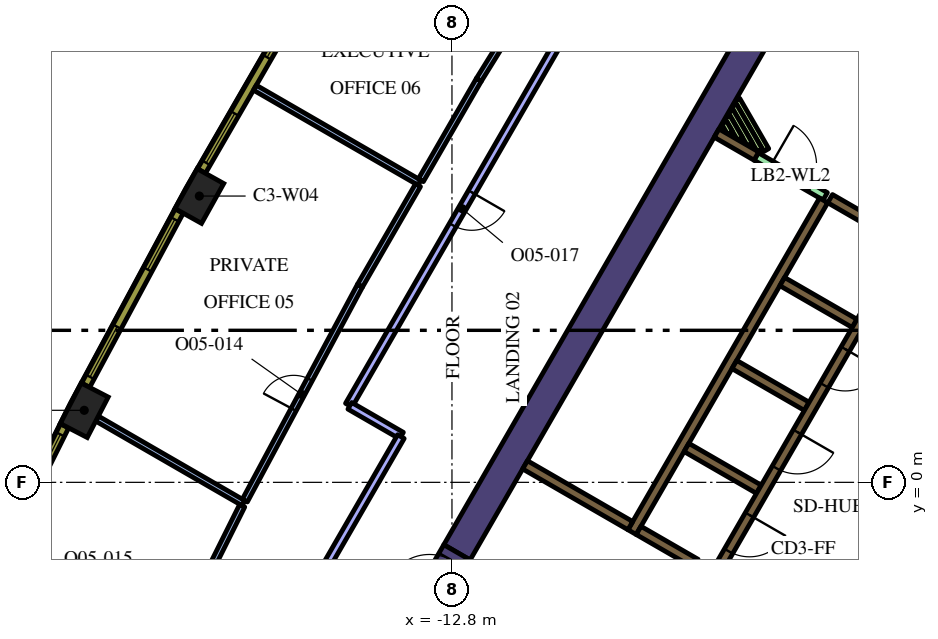
"""IFC4 building model, lengths in metres.
Left out: names, types, materials, properties, quantities, classifications, styles, units other than length and angle.
Written with IfcOpenShell. Run it as: python <this file> out.ifc"""

import sys

from ifc_helpers import new_model, si_unit, direction, frame, frame_2d, origin, origin_2d, place, context, subcontext, project, spatial, polyline, rectangle, outline, extrude, element, fill, save


model = new_model("IFC4")
c1 = context("Model", 3, precision=1e-05, world=origin(), true_north=direction((0.0, 1.0)))
c2 = subcontext(c1, "Body", "Model", "MODEL_VIEW")
j1 = project(units=[si_unit("LENGTHUNIT", "METRE"), si_unit("PLANEANGLEUNIT", "RADIAN")], contexts=[c1])
p1 = place(None, origin())
s1 = spatial("IfcSite", under=j1, at=p1, CompositionType="ELEMENT")
p2 = place(p1, origin())
s2 = spatial("IfcBuilding", under=s1, at=p2, CompositionType="ELEMENT")
p3 = place(p2, frame((0.0, 0.0, 192.0)))
s3 = spatial("IfcBuildingStorey", under=s2, at=p3, CompositionType="ELEMENT", Elevation=192.0)
for number, where, z_axis, x_axis in (
    (1, (-19.447, 7.533, 0.0), (0.0, 0.0, 1.0), (-0.487, -0.874, 0.0)),
    (2, (-22.476, 1.896, 0.0), (0.0, 0.0, 1.0), (-0.46, -0.888, 0.0)),
):
    element("IfcColumn", number, at=place(p3, frame(where, z_axis=z_axis, x_axis=x_axis)), inside=s3, PredefinedType="COLUMN", context=c2, shape_type="SweptSolid", body=[
        extrude(rectangle(XDim=1.2, YDim=0.8, at=origin_2d()), origin(), (0.0, 0.0, 1.0), 4.2),
    ])
p4 = place(p3, frame((-4.321, 12.616, 0.0), z_axis=(0.0, 0.0, 1.0), x_axis=(-0.500009809857, -0.866019739987, 0.0)))
e3 = element("IfcWall", 3, at=p4, inside=s3, PredefinedType="SOLIDWALL", context=c2, shape_type="SweptSolid", body=[
    extrude(rectangle(XDim=16.695, YDim=0.8, at=frame_2d((8.347, 0.0))), origin(), (0.0, 0.0, 1.0), 4.2),
])
p5 = place(p3, frame((-3.02, 7.419, 0.0), z_axis=(0.0, 0.0, 1.0), x_axis=(-0.500022956343, -0.866012149528, 0.0)))
e4 = element("IfcWall", 4, at=p5, inside=s3, PredefinedType="SOLIDWALL", context=c2, shape_type="SweptSolid", body=[
    extrude(rectangle(XDim=10.08, YDim=0.25, at=frame_2d((5.04, 0.0))), origin(), (0.0, 0.0, 1.0), 4.2),
])
p6 = place(p3, origin())
e5 = element("IfcWall", 5, at=p6, inside=s3, PredefinedType="SOLIDWALL", context=c2, shape_type="SweptSolid", body=[
    extrude(outline(polyline([(-2.912, 7.356), (-2.787, 7.573), (-1.232, 6.675), (-1.303, 6.675), (-1.304, 6.675), (-1.304, 6.675), (-1.304, 6.525), (-1.304, 6.525), (-1.303, 6.525), (-0.971, 6.525), (-0.665, 6.348), (-0.79, 6.132), (-1.007, 6.257), (-1.007, 6.257), (-2.912, 7.356)])), origin(), (0.0, 0.0, 1.0), 4.2),
])
for number, where, z_axis, x_axis in (
    (6, (-2.204, 4.182, 0.0), (0.0, 0.0, 1.0), (-0.866, 0.5, 0.0)),
    (7, (-5.369, 3.1, 0.0), (0.0, 0.0, 1.0), (0.866, -0.5, 0.0)),
    (8, (-4.724, -0.182, 0.0), (0.0, 0.0, 1.0), (-0.866, 0.5, 0.0)),
):
    element("IfcWall", number, at=place(p3, frame(where, z_axis=z_axis, x_axis=x_axis)), inside=s3, PredefinedType="SOLIDWALL", context=c2, shape_type="SweptSolid", body=[
        extrude(rectangle(XDim=2.2, YDim=0.25, at=frame_2d((1.1, 0.0))), origin(), (0.0, 0.0, 1.0), 4.2),
    ])
p7 = place(p3, frame((-7.889, -1.265, 0.0), z_axis=(0.0, 0.0, 1.0), x_axis=(0.865986741702, -0.500066958712, 0.0)))
e9 = element("IfcWall", 9, at=p7, inside=s3, PredefinedType="SOLIDWALL", context=c2, shape_type="SweptSolid", body=[
    extrude(rectangle(XDim=1.738, YDim=0.25, at=frame_2d((0.869, 0.0))), origin(), (0.0, 0.0, 1.0), 4.2),
])
p8 = place(p3, frame((-8.106, -1.14, 0.0), z_axis=(0.0, 0.0, 1.0), x_axis=(-0.866008981251, 0.500028443584, 0.0)))
e10 = element("IfcWall", 10, at=p8, inside=s3, PredefinedType="SOLIDWALL", context=c2, shape_type="SweptSolid", body=[
    extrude(rectangle(XDim=3.2, YDim=0.25, at=frame_2d((1.6, 0.0))), origin(), (0.0, 0.0, 1.0), 4.2),
])
p9 = place(p3, frame((-5.837, 9.19, 0.0), z_axis=(0.0, 0.0, 1.0), x_axis=(0.866024298998, -0.500001913541, 0.0)))
e11 = element("IfcWall", 11, at=p9, inside=s3, PredefinedType="SOLIDWALL", context=c2, shape_type="SweptSolid", body=[
    extrude(rectangle(XDim=1.21, YDim=0.25, at=frame_2d((0.605, 0.0))), origin(), (0.0, 0.0, 1.0), 4.2),
])
p10 = place(p3, frame((-5.294, 10.067, 0.0), z_axis=(0.0, 0.0, 1.0), x_axis=(0.500054140411, -0.865994143547, 0.0)))
e12 = element("IfcWall", 12, at=p10, inside=s3, PredefinedType="PARTITIONING", context=c2, shape_type="SweptSolid", body=[
    extrude(rectangle(XDim=1.529, YDim=0.15, at=frame_2d((0.765, 0.0))), origin(), (0.0, 0.0, 1.0), 3.1),
])
p11 = place(p3, frame((-5.381, 9.917, 0.0), z_axis=(0.0, 0.0, 1.0), x_axis=(0.500136970483, -0.865946309396, 0.0)))
e13 = element("IfcWall", 13, at=p11, inside=s3, PredefinedType="PARTITIONING", context=c2, shape_type="SweptSolid", body=[
    extrude(rectangle(XDim=1.359, YDim=0.15, at=frame_2d((0.68, 0.0))), origin(), (0.0, 0.0, 1.0), 3.1),
])
p12 = place(p3, frame((-5.467, 9.767, 0.0), z_axis=(0.0, 0.0, 1.0), x_axis=(0.500168849293, -0.86592789665, 0.0)))
e14 = element("IfcWall", 14, at=p12, inside=s3, PredefinedType="PARTITIONING", context=c2, shape_type="SweptSolid", body=[
    extrude(rectangle(XDim=1.01, YDim=0.15, at=frame_2d((0.505, 0.0))), origin(), (0.0, 0.0, 1.0), 3.1),
])
p13 = place(p3, frame((-5.554, 9.617, 0.0), z_axis=(0.0, 0.0, 1.0), x_axis=(0.500253084543, -0.86587923604, 0.0)))
e15 = element("IfcWall", 15, at=p13, inside=s3, PredefinedType="PARTITIONING", context=c2, shape_type="SweptSolid", body=[
    extrude(rectangle(XDim=0.664, YDim=0.15, at=frame_2d((0.332, 0.0))), origin(), (0.0, 0.0, 1.0), 3.1),
])
p14 = place(p3, frame((-5.64, 9.467, 0.0), z_axis=(0.0, 0.0, 1.0), x_axis=(0.499944387978, -0.86605750902, 0.0)))
e16 = element("IfcWall", 16, at=p14, inside=s3, PredefinedType="PARTITIONING", context=c2, shape_type="SweptSolid", body=[
    extrude(rectangle(XDim=0.317, YDim=0.15, at=frame_2d((0.159, 0.0))), origin(), (0.0, 0.0, 1.0), 3.1),
])
p15 = place(p3, frame((-0.898, 6.194, 0.0), z_axis=(0.0, 0.0, 1.0), x_axis=(-0.499996202215, -0.866027596426, 0.0)))
e17 = element("IfcWall", 17, at=p15, inside=s3, PredefinedType="SOLIDWALL", context=c2, shape_type="SweptSolid", body=[
    extrude(rectangle(XDim=9.83, YDim=0.25, at=frame_2d((4.915, 0.0))), origin(), (0.0, 0.0, 1.0), 4.2),
])
p16 = place(p15, frame((0.585, 0.0, 0.0)))
e18 = element("IfcOpeningElement", 18, at=p16, cuts=e17, PredefinedType="OPENING", context=c2, shape_type="SweptSolid", body=[
    extrude(rectangle(XDim=1.1, YDim=2.1, at=frame_2d((0.55, 1.05))), frame((0.0, 0.135, 0.0), z_axis=(0.0, -1.0, 0.0), x_axis=(1.0, 0.0, 0.0)), (0.0, 0.0, 1.0), 0.27),
])
p17 = place(p15, frame((3.105, 0.0, 0.0)))
e19 = element("IfcOpeningElement", 19, at=p17, cuts=e17, PredefinedType="OPENING", context=c2, shape_type="SweptSolid", body=[
    extrude(rectangle(XDim=1.1, YDim=2.1, at=frame_2d((0.55, 1.05))), frame((0.0, 0.135, 0.0), z_axis=(0.0, -1.0, 0.0), x_axis=(1.0, 0.0, 0.0)), (0.0, 0.0, 1.0), 0.27),
])
p18 = place(p15, frame((5.625, 0.0, 0.0)))
e20 = element("IfcOpeningElement", 20, at=p18, cuts=e17, PredefinedType="OPENING", context=c2, shape_type="SweptSolid", body=[
    extrude(rectangle(XDim=1.1, YDim=2.1, at=frame_2d((0.55, 1.05))), frame((0.0, 0.135, 0.0), z_axis=(0.0, -1.0, 0.0), x_axis=(1.0, 0.0, 0.0)), (0.0, 0.0, 1.0), 0.27),
])
p19 = place(p15, frame((8.145, 0.0, 0.0)))
e21 = element("IfcOpeningElement", 21, at=p19, cuts=e17, PredefinedType="OPENING", context=c2, shape_type="SweptSolid", body=[
    extrude(rectangle(XDim=1.1, YDim=2.1, at=frame_2d((0.55, 1.05))), frame((0.0, 0.135, 0.0), z_axis=(0.0, -1.0, 0.0), x_axis=(1.0, 0.0, 0.0)), (0.0, 0.0, 1.0), 0.27),
])
p20 = place(p3, frame((-4.796, 8.575, 0.0), z_axis=(0.0, 0.0, 1.0), x_axis=(0.866009402589, -0.500027713859, 0.0)))
e22 = element("IfcWall", 22, at=p20, inside=s3, PredefinedType="PARTITIONING", context=c2, shape_type="SweptSolid", body=[
    extrude(rectangle(XDim=2.1, YDim=0.226, at=frame_2d((1.05, 0.0))), origin(), (0.0, 0.0, 1.0), 3.1),
])
p21 = place(p20, frame((0.45, 0.0, 0.0)))
e23 = element("IfcOpeningElement", 23, at=p21, cuts=e22, PredefinedType="OPENING", context=c2, shape_type="SweptSolid", body=[
    extrude(rectangle(XDim=1.2, YDim=2.1, at=frame_2d((0.6, 1.05))), frame((0.0, 0.123, 0.0), z_axis=(0.0, -1.0, 0.0), x_axis=(1.0, 0.0, 0.0)), (0.0, 0.0, 1.0), 0.246),
])
p22 = place(p3, frame((-13.518, -3.314, 0.0), z_axis=(0.0, 0.0, 1.0), x_axis=(0.500000056704, 0.866025371046, 0.0)))
e24 = element("IfcWall", 24, at=p22, inside=s3, PredefinedType="SOLIDWALL", context=c2, shape_type="SweptSolid", body=[
    extrude(rectangle(XDim=1.7, YDim=0.8, at=frame_2d((0.85, 0.0))), origin(), (0.0, 0.0, 1.0), 4.2),
])
p23 = place(p22, frame((0.25, 0.0, 0.0)))
e25 = element("IfcOpeningElement", 25, at=p23, cuts=e24, PredefinedType="OPENING", context=c2, shape_type="SweptSolid", body=[
    extrude(rectangle(XDim=1.2, YDim=2.1, at=frame_2d((0.6, 1.05))), frame((0.0, 0.41, 0.0), z_axis=(0.0, -1.0, 0.0), x_axis=(1.0, 0.0, 0.0)), (0.0, 0.0, 1.0), 0.82),
])
p24 = place(p3, frame((-13.656, 7.884, 0.0), z_axis=(0.0, 0.0, 1.0), x_axis=(-0.866022959057, 0.500004234368, 0.0)))
e26 = element("IfcWall", 26, at=p24, inside=s3, PredefinedType="PARTITIONING", context=c2, shape_type="SweptSolid", body=[
    extrude(rectangle(XDim=5.0, YDim=0.15, at=frame_2d((2.5, 0.0))), origin(), (0.0, 0.0, 1.0), 3.1),
])
p25 = place(p3, frame((-12.093, 10.591, 0.0), z_axis=(0.0, 0.0, 1.0), x_axis=(0.527179193015, 0.849754140003, 0.0)))
e27 = element("IfcWall", 27, at=p25, inside=s3, PredefinedType="PARTITIONING", context=c2, shape_type="SweptSolid", body=[
    extrude(rectangle(XDim=6.42, YDim=0.15, at=frame_2d((3.21, 0.0))), origin(), (0.0, 0.0, 1.0), 3.1),
])
p26 = place(p25, frame((2.719, 0.0, 0.0)))
e28 = element("IfcOpeningElement", 28, at=p26, cuts=e27, PredefinedType="OPENING", context=c2, shape_type="SweptSolid", body=[
    extrude(rectangle(XDim=0.9, YDim=2.1, at=frame_2d((0.45, 1.05))), frame((0.0, 0.085, 0.0), z_axis=(0.0, -1.0, 0.0), x_axis=(1.0, 0.0, 0.0)), (0.0, 0.0, 1.0), 0.17),
])
p27 = place(p3, frame((-12.093, 10.591, 0.0), z_axis=(0.0, 0.0, 1.0), x_axis=(-0.499994921628, -0.866028335764, 0.0)))
e29 = element("IfcWall", 29, at=p27, inside=s3, PredefinedType="PARTITIONING", context=c2, shape_type="SweptSolid", body=[
    extrude(rectangle(XDim=3.051, YDim=0.15, at=frame_2d((1.525, 0.0))), origin(), (0.0, 0.0, 1.0), 3.1),
])
p28 = place(p3, frame((-18.286, -0.547, 0.0), z_axis=(0.0, 0.0, 1.0), x_axis=(-0.866043033223, 0.499969463673, 0.0)))
e30 = element("IfcWall", 30, at=p28, inside=s3, PredefinedType="PARTITIONING", context=c2, shape_type="SweptSolid", body=[
    extrude(rectangle(XDim=4.449, YDim=0.15, at=frame_2d((2.225, 0.0))), origin(), (0.0, 0.0, 1.0), 3.1),
])
p29 = place(p3, frame((-13.693, 7.819, 0.0), z_axis=(0.0, 0.0, 1.0), x_axis=(-0.500054937028, -0.865993683553, 0.0)))
e31 = element("IfcWall", 31, at=p29, inside=s3, PredefinedType="PARTITIONING", context=c2, shape_type="SweptSolid", body=[
    extrude(rectangle(XDim=3.051, YDim=0.15, at=frame_2d((1.525, 0.0))), origin(), (0.0, 0.0, 1.0), 3.1),
])
p30 = place(p3, frame((-18.251, -0.481, 0.0), z_axis=(0.0, 0.0, 1.0), x_axis=(0.472318506028, 0.881427948765, 0.0)))
e32 = element("IfcWall", 32, at=p30, inside=s3, PredefinedType="PARTITIONING", context=c2, shape_type="SweptSolid", body=[
    extrude(rectangle(XDim=6.419, YDim=0.15, at=frame_2d((3.21, 0.0))), origin(), (0.0, 0.0, 1.0), 3.1),
])
p31 = place(p30, frame((2.719, 0.0, 0.0)))
e33 = element("IfcOpeningElement", 33, at=p31, cuts=e32, PredefinedType="OPENING", context=c2, shape_type="SweptSolid", body=[
    extrude(rectangle(XDim=0.9, YDim=2.1, at=frame_2d((0.45, 1.05))), frame((0.0, 0.085, 0.0), z_axis=(0.0, -1.0, 0.0), x_axis=(1.0, 0.0, 0.0)), (0.0, 0.0, 1.0), 0.17),
])
p32 = place(p3, frame((-20.968, -5.925, 0.0), z_axis=(0.0, 0.0, 1.0), x_axis=(0.446258864447, 0.894903919928, 0.0)))
e34 = element("IfcWall", 34, at=p32, inside=s3, PredefinedType="PARTITIONING", context=c2, shape_type="SweptSolid", body=[
    extrude(rectangle(XDim=5.934, YDim=0.15, at=frame_2d((2.967, 0.0))), origin(), (0.0, 0.0, 1.0), 3.1),
])
p33 = place(p32, frame((2.534, 0.0, 0.0)))
e35 = element("IfcOpeningElement", 35, at=p33, cuts=e34, PredefinedType="OPENING", context=c2, shape_type="SweptSolid", body=[
    extrude(rectangle(XDim=0.9, YDim=2.1, at=frame_2d((0.45, 1.05))), frame((0.0, 0.085, 0.0), z_axis=(0.0, -1.0, 0.0), x_axis=(1.0, 0.0, 0.0)), (0.0, 0.0, 1.0), 0.17),
])
p34 = place(p3, frame((-9.529, 12.395, 0.0), z_axis=(0.0, 0.0, 1.0), x_axis=(-0.500001991949, -0.866024253729, 0.0)))
e36 = element("IfcWall", 36, at=p34, inside=s3, PredefinedType="PARTITIONING", context=c2, shape_type="SweptSolid", body=[
    extrude(rectangle(XDim=11.97, YDim=0.2, at=frame_2d((5.985, 0.0))), origin(), (0.0, 0.0, 1.0), 3.1),
])
p35 = place(p34, frame((5.5, 0.0, 0.0)))
e37 = element("IfcOpeningElement", 37, at=p35, cuts=e36, PredefinedType="OPENING", context=c2, shape_type="SweptSolid", body=[
    extrude(rectangle(XDim=1.0, YDim=2.1, at=frame_2d((0.5, 1.05))), frame((0.0, 0.11, 0.0), z_axis=(0.0, -1.0, 0.0), x_axis=(1.0, 0.0, 0.0)), (0.0, 0.0, 1.0), 0.22),
])
p36 = place(p3, frame((-15.488, 2.014, 0.0), z_axis=(0.0, 0.0, 1.0), x_axis=(0.865975818674, -0.500085874098, 0.0)))
e38 = element("IfcWall", 38, at=p36, inside=s3, PredefinedType="PARTITIONING", context=c2, shape_type="SweptSolid", body=[
    extrude(rectangle(XDim=1.57, YDim=0.2, at=frame_2d((0.785, 0.0))), origin(), (0.0, 0.0, 1.0), 3.1),
])
p37 = place(p3, frame((-14.143, 1.203, 0.0), z_axis=(0.0, 0.0, 1.0), x_axis=(-0.500010806419, -0.866019164606, 0.0)))
e39 = element("IfcWall", 39, at=p37, inside=s3, PredefinedType="PARTITIONING", context=c2, shape_type="SweptSolid", body=[
    extrude(rectangle(XDim=8.721, YDim=0.2, at=frame_2d((4.361, 0.0))), origin(), (0.0, 0.0, 1.0), 3.1),
])
p38 = place(p3, frame((-16.789, 12.697, 0.0), z_axis=(0.0, 0.0, 1.0), x_axis=(-0.500009456303, -0.866019944116, 0.0)))
e40 = element("IfcWall", 40, at=p38, inside=s3, PredefinedType="SOLIDWALL", context=c2, shape_type="SweptSolid", body=[
    extrude(rectangle(XDim=5.204, YDim=0.24, at=frame_2d((2.602, 0.0))), origin(), (0.0, 0.0, 1.0), 3.9),
])
p39 = place(p38, frame((0.248, 0.0, 0.9)))
e41 = element("IfcOpeningElement", 41, at=p39, cuts=e40, PredefinedType="OPENING", context=c2, shape_type="SweptSolid", body=[
    extrude(rectangle(XDim=1.5, YDim=2.55, at=frame_2d((0.75, 1.275))), frame((0.0, 0.13, 0.0), z_axis=(0.0, -1.0, 0.0), x_axis=(1.0, 0.0, 0.0)), (0.0, 0.0, 1.0), 0.26),
])
p40 = place(p38, frame((3.455, 0.0, 0.9)))
e42 = element("IfcOpeningElement", 42, at=p40, cuts=e40, PredefinedType="OPENING", context=c2, shape_type="SweptSolid", body=[
    extrude(rectangle(XDim=1.5, YDim=2.55, at=frame_2d((0.75, 1.275))), frame((0.0, 0.13, 0.0), z_axis=(0.0, -1.0, 0.0), x_axis=(1.0, 0.0, 0.0)), (0.0, 0.0, 1.0), 0.26),
])
p41 = place(p3, frame((-19.977, 7.139, 0.0), z_axis=(0.0, 0.0, 1.0), x_axis=(-0.473349833294, -0.880874528704, 0.0)))
e43 = element("IfcWall", 43, at=p41, inside=s3, PredefinedType="SOLIDWALL", context=c2, shape_type="SweptSolid", body=[
    extrude(rectangle(XDim=5.204, YDim=0.24, at=frame_2d((2.602, 0.0))), origin(), (0.0, 0.0, 1.0), 3.9),
])
p42 = place(p41, frame((0.248, 0.0, 0.9)))
e44 = element("IfcOpeningElement", 44, at=p42, cuts=e43, PredefinedType="OPENING", context=c2, shape_type="SweptSolid", body=[
    extrude(rectangle(XDim=1.5, YDim=2.55, at=frame_2d((0.75, 1.275))), frame((0.0, 0.13, 0.0), z_axis=(0.0, -1.0, 0.0), x_axis=(1.0, 0.0, 0.0)), (0.0, 0.0, 1.0), 0.26),
])
p43 = place(p41, frame((3.455, 0.0, 0.9)))
e45 = element("IfcOpeningElement", 45, at=p43, cuts=e43, PredefinedType="OPENING", context=c2, shape_type="SweptSolid", body=[
    extrude(rectangle(XDim=1.5, YDim=2.55, at=frame_2d((0.75, 1.275))), frame((0.0, 0.13, 0.0), z_axis=(0.0, -1.0, 0.0), x_axis=(1.0, 0.0, 0.0)), (0.0, 0.0, 1.0), 0.26),
])
p44 = place(p3, frame((-22.994, 1.485, 0.0), z_axis=(0.0, 0.0, 1.0), x_axis=(-0.446256171312, -0.8949052629, 0.0)))
e46 = element("IfcWall", 46, at=p44, inside=s3, PredefinedType="SOLIDWALL", context=c2, shape_type="SweptSolid", body=[
    extrude(rectangle(XDim=5.203, YDim=0.24, at=frame_2d((2.602, 0.0))), origin(), (0.0, 0.0, 1.0), 3.9),
])
p45 = place(p44, frame((0.248, 0.0, 0.9)))
e47 = element("IfcOpeningElement", 47, at=p45, cuts=e46, PredefinedType="OPENING", context=c2, shape_type="SweptSolid", body=[
    extrude(rectangle(XDim=1.5, YDim=2.55, at=frame_2d((0.75, 1.275))), frame((0.0, 0.13, 0.0), z_axis=(0.0, -1.0, 0.0), x_axis=(1.0, 0.0, 0.0)), (0.0, 0.0, 1.0), 0.26),
])
p46 = place(p44, frame((3.455, 0.0, 0.9)))
e48 = element("IfcOpeningElement", 48, at=p46, cuts=e46, PredefinedType="OPENING", context=c2, shape_type="SweptSolid", body=[
    extrude(rectangle(XDim=1.5, YDim=2.55, at=frame_2d((0.75, 1.275))), frame((0.0, 0.13, 0.0), z_axis=(0.0, -1.0, 0.0), x_axis=(1.0, 0.0, 0.0)), (0.0, 0.0, 1.0), 0.26),
])
p47 = place(p17, origin())
e49 = element("IfcDoor", 49, at=p47, inside=s3, OperationType="DOUBLE_DOOR_SLIDING", PredefinedType="DOOR", context=c2, shape_type="SweptSolid", body=[
    extrude(rectangle(XDim=1.1, YDim=2.1, at=frame_2d((0.55, 1.05))), frame((0.0, 0.025, 0.0), z_axis=(0.0, -1.0, 0.0), x_axis=(1.0, 0.0, 0.0)), (0.0, 0.0, 1.0), 0.05),
])
fill(e19, e49)
p48 = place(p18, origin())
e50 = element("IfcDoor", 50, at=p48, inside=s3, OperationType="DOUBLE_DOOR_SLIDING", PredefinedType="DOOR", context=c2, shape_type="SweptSolid", body=[
    extrude(rectangle(XDim=1.1, YDim=2.1, at=frame_2d((0.55, 1.05))), frame((0.0, 0.025, 0.0), z_axis=(0.0, -1.0, 0.0), x_axis=(1.0, 0.0, 0.0)), (0.0, 0.0, 1.0), 0.05),
])
fill(e20, e50)
p49 = place(p19, origin())
e51 = element("IfcDoor", 51, at=p49, inside=s3, OperationType="DOUBLE_DOOR_SLIDING", PredefinedType="DOOR", context=c2, shape_type="SweptSolid", body=[
    extrude(rectangle(XDim=1.1, YDim=2.1, at=frame_2d((0.55, 1.05))), frame((0.0, 0.025, 0.0), z_axis=(0.0, -1.0, 0.0), x_axis=(1.0, 0.0, 0.0)), (0.0, 0.0, 1.0), 0.05),
])
fill(e21, e51)
p50 = place(p21, origin())
e52 = element("IfcDoor", 52, at=p50, inside=s3, OperationType="SINGLE_SWING_LEFT", PredefinedType="DOOR", context=c2, shape_type="SweptSolid", body=[
    extrude(rectangle(XDim=1.2, YDim=2.1, at=frame_2d((0.6, 1.05))), frame((0.0, 0.025, 0.0), z_axis=(0.0, -1.0, 0.0), x_axis=(1.0, 0.0, 0.0)), (0.0, 0.0, 1.0), 0.05),
])
fill(e23, e52)
p51 = place(p31, origin())
e53 = element("IfcDoor", 53, at=p51, inside=s3, OperationType="SINGLE_SWING_LEFT", PredefinedType="DOOR", context=c2, shape_type="SweptSolid", body=[
    extrude(rectangle(XDim=0.9, YDim=2.1, at=frame_2d((0.45, 1.05))), frame((0.0, 0.025, 0.0), z_axis=(0.0, -1.0, 0.0), x_axis=(1.0, 0.0, 0.0)), (0.0, 0.0, 1.0), 0.05),
])
fill(e33, e53)
p52 = place(p35, origin())
e54 = element("IfcDoor", 54, at=p52, inside=s3, OperationType="SINGLE_SWING_RIGHT", PredefinedType="DOOR", context=c2, shape_type="SweptSolid", body=[
    extrude(rectangle(XDim=1.0, YDim=2.1, at=frame_2d((0.5, 1.05))), frame((0.0, 0.025, 0.0), z_axis=(0.0, -1.0, 0.0), x_axis=(1.0, 0.0, 0.0)), (0.0, 0.0, 1.0), 0.05),
])
fill(e37, e54)
p53 = place(p39, origin())
e55 = element("IfcWindow", 55, at=p53, inside=s3, PartitioningType="SINGLE_PANEL", PredefinedType="WINDOW", context=c2, shape_type="SweptSolid", body=[
    extrude(rectangle(XDim=1.5, YDim=2.55, at=frame_2d((0.75, 1.275))), frame((0.0, 0.04, 0.0), z_axis=(0.0, -1.0, 0.0), x_axis=(1.0, 0.0, 0.0)), (0.0, 0.0, 1.0), 0.06),
])
fill(e41, e55)
p54 = place(p40, origin())
e56 = element("IfcWindow", 56, at=p54, inside=s3, PartitioningType="SINGLE_PANEL", PredefinedType="WINDOW", context=c2, shape_type="SweptSolid", body=[
    extrude(rectangle(XDim=1.5, YDim=2.55, at=frame_2d((0.75, 1.275))), frame((0.0, 0.04, 0.0), z_axis=(0.0, -1.0, 0.0), x_axis=(1.0, 0.0, 0.0)), (0.0, 0.0, 1.0), 0.06),
])
fill(e42, e56)
p55 = place(p42, origin())
e57 = element("IfcWindow", 57, at=p55, inside=s3, PartitioningType="SINGLE_PANEL", PredefinedType="WINDOW", context=c2, shape_type="SweptSolid", body=[
    extrude(rectangle(XDim=1.5, YDim=2.55, at=frame_2d((0.75, 1.275))), frame((0.0, 0.04, 0.0), z_axis=(0.0, -1.0, 0.0), x_axis=(1.0, 0.0, 0.0)), (0.0, 0.0, 1.0), 0.06),
])
fill(e44, e57)
p56 = place(p43, origin())
e58 = element("IfcWindow", 58, at=p56, inside=s3, PartitioningType="SINGLE_PANEL", PredefinedType="WINDOW", context=c2, shape_type="SweptSolid", body=[
    extrude(rectangle(XDim=1.5, YDim=2.55, at=frame_2d((0.75, 1.275))), frame((0.0, 0.04, 0.0), z_axis=(0.0, -1.0, 0.0), x_axis=(1.0, 0.0, 0.0)), (0.0, 0.0, 1.0), 0.06),
])
fill(e45, e58)
p57 = place(p45, origin())
e59 = element("IfcWindow", 59, at=p57, inside=s3, PartitioningType="SINGLE_PANEL", PredefinedType="WINDOW", context=c2, shape_type="SweptSolid", body=[
    extrude(rectangle(XDim=1.5, YDim=2.55, at=frame_2d((0.75, 1.275))), frame((0.0, 0.04, 0.0), z_axis=(0.0, -1.0, 0.0), x_axis=(1.0, 0.0, 0.0)), (0.0, 0.0, 1.0), 0.06),
])
fill(e47, e59)
save(model, sys.argv[1])
